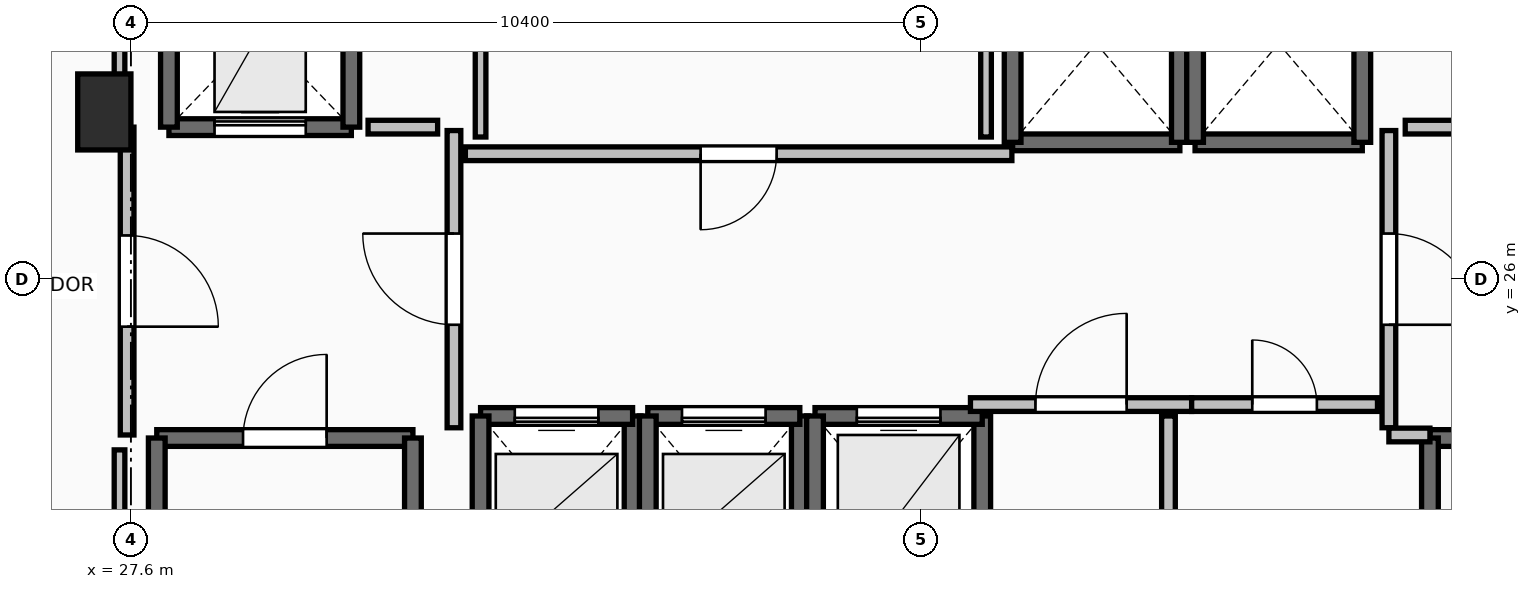
"""IFC4 building model, lengths in metres.
Left out: names, types, materials, properties, quantities, classifications, styles, units other than length and angle.
Written with IfcOpenShell. Run it as: python <this file> out.ifc"""

import sys

from ifc_helpers import new_model, si_unit, direction, frame, frame_2d, origin, origin_2d, place, context, subcontext, project, spatial, rectangle, extrude, element, fill, save


model = new_model("IFC4")
c1 = context("Model", 3, precision=1e-05, world=origin(), true_north=direction((0.0, 1.0)))
c2 = subcontext(c1, "Body", "Model", "MODEL_VIEW")
j1 = project(units=[si_unit("LENGTHUNIT", "METRE"), si_unit("PLANEANGLEUNIT", "RADIAN")], contexts=[c1])
p1 = place(None, origin())
s1 = spatial("IfcSite", under=j1, at=p1, CompositionType="ELEMENT")
p2 = place(p1, origin())
s2 = spatial("IfcBuilding", under=s1, at=p2, CompositionType="ELEMENT")
p3 = place(p2, frame((0.0, 0.0, 221.4)))
s3 = spatial("IfcBuildingStorey", under=s2, at=p3, CompositionType="ELEMENT", Elevation=221.4)
p4 = place(p3, frame((27.25, 28.2, 0.0), z_axis=(0.0, 0.0, 1.0), x_axis=(1.0, 0.0, 0.0)))
e1 = element("IfcColumn", 1, at=p4, inside=s3, PredefinedType="PILASTER", context=c2, shape_type="SweptSolid", body=[
    extrude(rectangle(XDim=0.7, YDim=1.0, at=origin_2d()), origin(), (0.0, 0.0, 1.0), 3.55),
])
p5 = place(p3, frame((27.94, 23.91, 0.0), z_axis=(0.0, 0.0, 1.0), x_axis=(1.0, 0.0, 0.0)))
e2 = element("IfcWall", 2, at=p5, inside=s3, PredefinedType="SOLIDWALL", context=c2, shape_type="SweptSolid", body=[
    extrude(rectangle(XDim=3.37, YDim=0.22, at=frame_2d((1.685, 0.0))), origin(), (0.0, 0.0, 1.0), 3.2),
])
p6 = place(p5, frame((1.135, 0.0, 0.0)))
e3 = element("IfcOpeningElement", 3, at=p6, cuts=e2, PredefinedType="OPENING", context=c2, shape_type="SweptSolid", body=[
    extrude(rectangle(XDim=1.1, YDim=2.15, at=frame_2d((0.55, 1.075))), frame((0.0, 0.125, 0.0), z_axis=(0.0, -1.0, 0.0), x_axis=(1.0, 0.0, 0.0)), (0.0, 0.0, 1.0), 0.25),
])
for number, where, z_axis, x_axis in (
    (4, (31.31, 23.91, 0.0), (0.0, 0.0, 1.0), (0.0, -1.0, 0.0)),
    (5, (27.94, 16.49, 0.0), (0.0, 0.0, 1.0), (0.0, 1.0, 0.0)),
):
    element("IfcWall", number, at=place(p3, frame(where, z_axis=z_axis, x_axis=x_axis)), inside=s3, PredefinedType="SOLIDWALL", context=c2, shape_type="SweptSolid", body=[
        extrude(rectangle(XDim=7.42, YDim=0.22, at=frame_2d((3.71, 0.0))), origin(), (0.0, 0.0, 1.0), 3.2),
    ])
p7 = place(p3, frame((44.69, 23.91, 0.0), z_axis=(0.0, 0.0, 1.0), x_axis=(1.0, 0.0, 0.0)))
e6 = element("IfcWall", 6, at=p7, inside=s3, PredefinedType="SOLIDWALL", context=c2, shape_type="SweptSolid", body=[
    extrude(rectangle(XDim=3.37, YDim=0.22, at=frame_2d((1.685, 0.0))), origin(), (0.0, 0.0, 1.0), 3.2),
])
p8 = place(p7, frame((1.135, 0.0, 0.0)))
e7 = element("IfcOpeningElement", 7, at=p8, cuts=e6, PredefinedType="OPENING", context=c2, shape_type="SweptSolid", body=[
    extrude(rectangle(XDim=1.1, YDim=2.15, at=frame_2d((0.55, 1.075))), frame((0.0, 0.125, 0.0), z_axis=(0.0, -1.0, 0.0), x_axis=(1.0, 0.0, 0.0)), (0.0, 0.0, 1.0), 0.25),
])
p9 = place(p3, frame((44.69, 16.49, 0.0), z_axis=(0.0, 0.0, 1.0), x_axis=(0.0, 1.0, 0.0)))
e8 = element("IfcWall", 8, at=p9, inside=s3, PredefinedType="SOLIDWALL", context=c2, shape_type="SweptSolid", body=[
    extrude(rectangle(XDim=7.42, YDim=0.22, at=frame_2d((3.71, 0.0))), origin(), (0.0, 0.0, 1.0), 3.2),
])
p10 = place(p3, frame((34.2, 21.8, 0.0), z_axis=(0.0, 0.0, 1.0), x_axis=(0.0, 1.0, 0.0)))
e9 = element("IfcWall", 9, at=p10, inside=s3, PredefinedType="SOLIDWALL", context=c2, shape_type="SweptSolid", body=[
    extrude(rectangle(XDim=2.4, YDim=0.22, at=frame_2d((1.2, 0.0))), origin(), (0.0, 0.0, 1.0), 3.2),
])
p11 = place(p3, frame((34.2, 24.2, 0.0), z_axis=(0.0, 0.0, 1.0), x_axis=(-1.0, 0.0, 0.0)))
e10 = element("IfcWall", 10, at=p11, inside=s3, PredefinedType="SOLIDWALL", context=c2, shape_type="SweptSolid", body=[
    extrude(rectangle(XDim=2.0, YDim=0.22, at=frame_2d((1.0, 0.0))), origin(), (0.0, 0.0, 1.0), 3.2),
])
p12 = place(p11, frame((0.45, 0.0, 0.0)))
e11 = element("IfcOpeningElement", 11, at=p12, cuts=e10, PredefinedType="OPENING", context=c2, shape_type="SweptSolid", body=[
    extrude(rectangle(XDim=1.1, YDim=2.2, at=frame_2d((0.55, 1.1))), frame((0.0, 0.125, 0.0), z_axis=(0.0, -1.0, 0.0), x_axis=(1.0, 0.0, 0.0)), (0.0, 0.0, 1.0), 0.25),
])
for number, where, z_axis, x_axis in (
    (12, (32.2, 24.2, 0.0), (0.0, 0.0, 1.0), (0.0, -1.0, 0.0)),
    (13, (36.4, 21.8, 0.0), (0.0, 0.0, 1.0), (0.0, 1.0, 0.0)),
):
    element("IfcWall", number, at=place(p3, frame(where, z_axis=z_axis, x_axis=x_axis)), inside=s3, PredefinedType="SOLIDWALL", context=c2, shape_type="SweptSolid", body=[
        extrude(rectangle(XDim=2.4, YDim=0.22, at=frame_2d((1.2, 0.0))), origin(), (0.0, 0.0, 1.0), 3.2),
    ])
p13 = place(p3, frame((36.4, 24.2, 0.0), z_axis=(0.0, 0.0, 1.0), x_axis=(-1.0, 0.0, 0.0)))
e14 = element("IfcWall", 14, at=p13, inside=s3, PredefinedType="SOLIDWALL", context=c2, shape_type="SweptSolid", body=[
    extrude(rectangle(XDim=2.0, YDim=0.22, at=frame_2d((1.0, 0.0))), origin(), (0.0, 0.0, 1.0), 3.2),
])
p14 = place(p13, frame((0.45, 0.0, 0.0)))
e15 = element("IfcOpeningElement", 15, at=p14, cuts=e14, PredefinedType="OPENING", context=c2, shape_type="SweptSolid", body=[
    extrude(rectangle(XDim=1.1, YDim=2.2, at=frame_2d((0.55, 1.1))), frame((0.0, 0.125, 0.0), z_axis=(0.0, -1.0, 0.0), x_axis=(1.0, 0.0, 0.0)), (0.0, 0.0, 1.0), 0.25),
])
p15 = place(p3, frame((34.4, 24.2, 0.0), z_axis=(0.0, 0.0, 1.0), x_axis=(0.0, -1.0, 0.0)))
e16 = element("IfcWall", 16, at=p15, inside=s3, PredefinedType="SOLIDWALL", context=c2, shape_type="SweptSolid", body=[
    extrude(rectangle(XDim=2.4, YDim=0.22, at=frame_2d((1.2, 0.0))), origin(), (0.0, 0.0, 1.0), 3.2),
])
p16 = place(p3, frame((38.8, 21.6, 0.0), z_axis=(0.0, 0.0, 1.0), x_axis=(0.0, 1.0, 0.0)))
e17 = element("IfcWall", 17, at=p16, inside=s3, PredefinedType="SOLIDWALL", context=c2, shape_type="SweptSolid", body=[
    extrude(rectangle(XDim=2.6, YDim=0.22, at=frame_2d((1.3, 0.0))), origin(), (0.0, 0.0, 1.0), 3.2),
])
p17 = place(p3, frame((38.8, 24.2, 0.0), z_axis=(0.0, 0.0, 1.0), x_axis=(-1.0, 0.0, 0.0)))
e18 = element("IfcWall", 18, at=p17, inside=s3, PredefinedType="SOLIDWALL", context=c2, shape_type="SweptSolid", body=[
    extrude(rectangle(XDim=2.2, YDim=0.22, at=frame_2d((1.1, 0.0))), origin(), (0.0, 0.0, 1.0), 3.2),
])
p18 = place(p17, frame((0.55, 0.0, 0.0)))
e19 = element("IfcOpeningElement", 19, at=p18, cuts=e18, PredefinedType="OPENING", context=c2, shape_type="SweptSolid", body=[
    extrude(rectangle(XDim=1.1, YDim=2.2, at=frame_2d((0.55, 1.1))), frame((0.0, 0.125, 0.0), z_axis=(0.0, -1.0, 0.0), x_axis=(1.0, 0.0, 0.0)), (0.0, 0.0, 1.0), 0.25),
])
p19 = place(p3, frame((36.6, 24.2, 0.0), z_axis=(0.0, 0.0, 1.0), x_axis=(0.0, -1.0, 0.0)))
e20 = element("IfcWall", 20, at=p19, inside=s3, PredefinedType="SOLIDWALL", context=c2, shape_type="SweptSolid", body=[
    extrude(rectangle(XDim=2.6, YDim=0.22, at=frame_2d((1.3, 0.0))), origin(), (0.0, 0.0, 1.0), 3.2),
])
p20 = place(p3, frame((39.2, 27.8, 0.0), z_axis=(0.0, 0.0, 1.0), x_axis=(1.0, 0.0, 0.0)))
e21 = element("IfcWall", 21, at=p20, inside=s3, PredefinedType="SOLIDWALL", context=c2, shape_type="SweptSolid", body=[
    extrude(rectangle(XDim=2.2, YDim=0.22, at=frame_2d((1.1, 0.0))), origin(), (0.0, 0.0, 1.0), 3.2),
])
for number, where, z_axis, x_axis in (
    (22, (41.4, 27.8, 0.0), (0.0, 0.0, 1.0), (0.0, 1.0, 0.0)),
    (23, (39.2, 30.4, 0.0), (0.0, 0.0, 1.0), (0.0, -1.0, 0.0)),
):
    element("IfcWall", number, at=place(p3, frame(where, z_axis=z_axis, x_axis=x_axis)), inside=s3, PredefinedType="SOLIDWALL", context=c2, shape_type="SweptSolid", body=[
        extrude(rectangle(XDim=2.6, YDim=0.22, at=frame_2d((1.3, 0.0))), origin(), (0.0, 0.0, 1.0), 3.2),
    ])
p21 = place(p3, frame((41.6, 27.8, 0.0), z_axis=(0.0, 0.0, 1.0), x_axis=(1.0, 0.0, 0.0)))
e24 = element("IfcWall", 24, at=p21, inside=s3, PredefinedType="SOLIDWALL", context=c2, shape_type="SweptSolid", body=[
    extrude(rectangle(XDim=2.2, YDim=0.22, at=frame_2d((1.1, 0.0))), origin(), (0.0, 0.0, 1.0), 3.2),
])
for number, where, z_axis, x_axis in (
    (25, (43.8, 27.8, 0.0), (0.0, 0.0, 1.0), (0.0, 1.0, 0.0)),
    (26, (41.6, 30.4, 0.0), (0.0, 0.0, 1.0), (0.0, -1.0, 0.0)),
):
    element("IfcWall", number, at=place(p3, frame(where, z_axis=z_axis, x_axis=x_axis)), inside=s3, PredefinedType="SOLIDWALL", context=c2, shape_type="SweptSolid", body=[
        extrude(rectangle(XDim=2.6, YDim=0.22, at=frame_2d((1.3, 0.0))), origin(), (0.0, 0.0, 1.0), 3.2),
    ])
p22 = place(p3, frame((28.1, 28.0, 0.0), z_axis=(0.0, 0.0, 1.0), x_axis=(1.0, 0.0, 0.0)))
e27 = element("IfcWall", 27, at=p22, inside=s3, PredefinedType="SHEAR", context=c2, shape_type="SweptSolid", body=[
    extrude(rectangle(XDim=2.4, YDim=0.22, at=frame_2d((1.2, 0.0))), origin(), (0.0, 0.0, 1.0), 3.2),
])
p23 = place(p22, frame((0.6, 0.0, 0.0)))
e28 = element("IfcOpeningElement", 28, at=p23, cuts=e27, PredefinedType="OPENING", context=c2, shape_type="SweptSolid", body=[
    extrude(rectangle(XDim=1.2, YDim=2.2, at=frame_2d((0.6, 1.1))), frame((0.0, 0.125, 0.0), z_axis=(0.0, -1.0, 0.0), x_axis=(1.0, 0.0, 0.0)), (0.0, 0.0, 1.0), 0.25),
])
for number, where, z_axis, x_axis in (
    (29, (30.5, 28.0, 0.0), (0.0, 0.0, 1.0), (0.0, 1.0, 0.0)),
    (30, (28.1, 30.5, 0.0), (0.0, 0.0, 1.0), (0.0, -1.0, 0.0)),
):
    element("IfcWall", number, at=place(p3, frame(where, z_axis=z_axis, x_axis=x_axis)), inside=s3, PredefinedType="SHEAR", context=c2, shape_type="SweptSolid", body=[
        extrude(rectangle(XDim=2.5, YDim=0.22, at=frame_2d((1.25, 0.0))), origin(), (0.0, 0.0, 1.0), 3.2),
    ])
p24 = place(p3, frame((31.85, 24.045, 0.0), z_axis=(0.0, 0.0, 1.0), x_axis=(0.0, 1.0, 0.0)))
e31 = element("IfcWall", 31, at=p24, inside=s3, PredefinedType="PARTITIONING", context=c2, shape_type="SweptSolid", body=[
    extrude(rectangle(XDim=3.91, YDim=0.18, at=frame_2d((1.955, 0.0))), origin(), (0.0, 0.0, 1.0), 3.2),
])
p25 = place(p24, frame((1.355, 0.0, 0.0)))
e32 = element("IfcOpeningElement", 32, at=p25, cuts=e31, PredefinedType="OPENING", context=c2, shape_type="SweptSolid", body=[
    extrude(rectangle(XDim=1.2, YDim=2.15, at=frame_2d((0.6, 1.075))), frame((0.0, 0.105, 0.0), z_axis=(0.0, -1.0, 0.0), x_axis=(1.0, 0.0, 0.0)), (0.0, 0.0, 1.0), 0.21),
])
p26 = place(p3, frame((27.55, 28.0, 0.0), z_axis=(0.0, 0.0, 1.0), x_axis=(0.0, -1.0, 0.0)))
e33 = element("IfcWall", 33, at=p26, inside=s3, PredefinedType="PARTITIONING", context=c2, shape_type="SweptSolid", body=[
    extrude(rectangle(XDim=4.05, YDim=0.18, at=frame_2d((2.025, 0.0))), origin(), (0.0, 0.0, 1.0), 3.2),
])
p27 = place(p26, frame((1.425, 0.0, 0.0)))
e34 = element("IfcOpeningElement", 34, at=p27, cuts=e33, PredefinedType="OPENING", context=c2, shape_type="SweptSolid", body=[
    extrude(rectangle(XDim=1.2, YDim=2.15, at=frame_2d((0.6, 1.075))), frame((0.0, 0.105, 0.0), z_axis=(0.0, -1.0, 0.0), x_axis=(1.0, 0.0, 0.0)), (0.0, 0.0, 1.0), 0.21),
])
p28 = place(p3, frame((44.15, 27.955, 0.0), z_axis=(0.0, 0.0, 1.0), x_axis=(0.0, -1.0, 0.0)))
e35 = element("IfcWall", 35, at=p28, inside=s3, PredefinedType="PARTITIONING", context=c2, shape_type="SweptSolid", body=[
    extrude(rectangle(XDim=3.91, YDim=0.18, at=frame_2d((1.955, 0.0))), origin(), (0.0, 0.0, 1.0), 3.2),
])
p29 = place(p28, frame((1.355, 0.0, 0.0)))
e36 = element("IfcOpeningElement", 36, at=p29, cuts=e35, PredefinedType="OPENING", context=c2, shape_type="SweptSolid", body=[
    extrude(rectangle(XDim=1.2, YDim=2.15, at=frame_2d((0.6, 1.075))), frame((0.0, 0.105, 0.0), z_axis=(0.0, -1.0, 0.0), x_axis=(1.0, 0.0, 0.0)), (0.0, 0.0, 1.0), 0.21),
])
p30 = place(p3, frame((44.15, 23.95, 0.0), z_axis=(0.0, 0.0, 1.0), x_axis=(1.0, 0.0, 0.0)))
e37 = element("IfcWall", 37, at=p30, inside=s3, PredefinedType="PARTITIONING", context=c2, shape_type="SweptSolid", body=[
    extrude(rectangle(XDim=0.54, YDim=0.18, at=frame_2d((0.27, 0.0))), origin(), (0.0, 0.0, 1.0), 3.2),
])
p31 = place(p3, frame((38.645, 24.35, 0.0), z_axis=(0.0, 0.0, 1.0), x_axis=(1.0, 0.0, 0.0)))
e38 = element("IfcWall", 38, at=p31, inside=s3, PredefinedType="PARTITIONING", context=c2, shape_type="SweptSolid", body=[
    extrude(rectangle(XDim=2.91, YDim=0.18, at=frame_2d((1.455, 0.0))), origin(), (0.0, 0.0, 1.0), 3.2),
])
p32 = place(p31, frame((0.855, 0.0, 0.0)))
e39 = element("IfcOpeningElement", 39, at=p32, cuts=e38, PredefinedType="OPENING", context=c2, shape_type="SweptSolid", body=[
    extrude(rectangle(XDim=1.2, YDim=2.15, at=frame_2d((0.6, 1.075))), frame((0.0, 0.105, 0.0), z_axis=(0.0, -1.0, 0.0), x_axis=(1.0, 0.0, 0.0)), (0.0, 0.0, 1.0), 0.21),
])
p33 = place(p3, frame((41.555, 24.35, 0.0), z_axis=(0.0, 0.0, 1.0), x_axis=(1.0, 0.0, 0.0)))
e40 = element("IfcWall", 40, at=p33, inside=s3, PredefinedType="PARTITIONING", context=c2, shape_type="SweptSolid", body=[
    extrude(rectangle(XDim=2.445, YDim=0.18, at=frame_2d((1.223, 0.0))), origin(), (0.0, 0.0, 1.0), 3.2),
])
p34 = place(p33, frame((0.798, 0.0, 0.0)))
e41 = element("IfcOpeningElement", 41, at=p34, cuts=e40, PredefinedType="OPENING", context=c2, shape_type="SweptSolid", body=[
    extrude(rectangle(XDim=0.85, YDim=2.1, at=frame_2d((0.425, 1.05))), frame((0.0, 0.105, 0.0), z_axis=(0.0, -1.0, 0.0), x_axis=(1.0, 0.0, 0.0)), (0.0, 0.0, 1.0), 0.21),
])
p35 = place(p3, frame((39.19, 27.65, 0.0), z_axis=(0.0, 0.0, 1.0), x_axis=(-1.0, 0.0, 0.0)))
e42 = element("IfcWall", 42, at=p35, inside=s3, PredefinedType="PARTITIONING", context=c2, shape_type="SweptSolid", body=[
    extrude(rectangle(XDim=7.19, YDim=0.18, at=frame_2d((3.595, 0.0))), origin(), (0.0, 0.0, 1.0), 3.2),
])
p36 = place(p35, frame((3.095, 0.0, 0.0)))
e43 = element("IfcOpeningElement", 43, at=p36, cuts=e42, PredefinedType="OPENING", context=c2, shape_type="SweptSolid", body=[
    extrude(rectangle(XDim=1.0, YDim=2.15, at=frame_2d((0.5, 1.075))), frame((0.0, 0.105, 0.0), z_axis=(0.0, -1.0, 0.0), x_axis=(1.0, 0.0, 0.0)), (0.0, 0.0, 1.0), 0.21),
])
p37 = place(p3, frame((41.25, 20.305, 0.0), z_axis=(0.0, 0.0, 1.0), x_axis=(0.0, 1.0, 0.0)))
e44 = element("IfcWall", 44, at=p37, inside=s3, PredefinedType="PARTITIONING", context=c2, shape_type="SweptSolid", body=[
    extrude(rectangle(XDim=3.895, YDim=0.18, at=frame_2d((1.948, 0.0))), origin(), (0.0, 0.0, 1.0), 3.2),
])
p38 = place(p37, frame((1.522, 0.0, 0.0)))
e45 = element("IfcOpeningElement", 45, at=p38, cuts=e44, PredefinedType="OPENING", context=c2, shape_type="SweptSolid", body=[
    extrude(rectangle(XDim=0.85, YDim=2.1, at=frame_2d((0.425, 1.05))), frame((0.0, 0.105, 0.0), z_axis=(0.0, -1.0, 0.0), x_axis=(1.0, 0.0, 0.0)), (0.0, 0.0, 1.0), 0.21),
])
for number, where, z_axis, x_axis in (
    (46, (31.635, 28.0, 0.0), (0.0, 0.0, 1.0), (-1.0, 0.0, 0.0)),
    (47, (45.28, 28.0, 0.0), (0.0, 0.0, 1.0), (-1.0, 0.0, 0.0)),
):
    element("IfcWall", number, at=place(p3, frame(where, z_axis=z_axis, x_axis=x_axis)), inside=s3, PredefinedType="PARTITIONING", context=c2, shape_type="SweptSolid", body=[
        extrude(rectangle(XDim=0.915, YDim=0.18, at=frame_2d((0.458, 0.0))), origin(), (0.0, 0.0, 1.0), 3.2),
    ])
for number, where, z_axis, x_axis in (
    (48, (32.2, 30.26, 0.0), (0.0, 0.0, 1.0), (0.0, -1.0, 0.0)),
    (49, (38.85, 27.87, 0.0), (0.0, 0.0, 1.0), (0.0, 1.0, 0.0)),
):
    element("IfcWall", number, at=place(p3, frame(where, z_axis=z_axis, x_axis=x_axis)), inside=s3, PredefinedType="PARTITIONING", context=c2, shape_type="SweptSolid", body=[
        extrude(rectangle(XDim=2.39, YDim=0.14, at=frame_2d((1.195, 0.0))), origin(), (0.0, 0.0, 1.0), 3.2),
    ])
p39 = place(p3, frame((27.45, 33.45, 0.0), z_axis=(0.0, 0.0, 1.0), x_axis=(0.0, -1.0, 0.0)))
e50 = element("IfcWall", 50, at=p39, inside=s3, PredefinedType="PARTITIONING", context=c2, shape_type="SweptSolid", body=[
    extrude(rectangle(XDim=5.254, YDim=0.14, at=frame_2d((2.627, 0.0))), origin(), (0.0, 0.0, 1.0), 2.392),
])
p40 = place(p3, frame((27.45, 23.754, 0.0), z_axis=(0.0, 0.0, 1.0), x_axis=(0.0, -1.0, 0.0)))
e51 = element("IfcWall", 51, at=p40, inside=s3, PredefinedType="PARTITIONING", context=c2, shape_type="SweptSolid", body=[
    extrude(rectangle(XDim=7.514, YDim=0.14, at=frame_2d((3.757, 0.0))), origin(), (0.0, 0.0, 1.0), 2.392),
])
p41 = place(p6, origin())
e52 = element("IfcDoor", 52, at=p41, inside=s3, OperationType="SINGLE_SWING_RIGHT", PredefinedType="DOOR", context=c2, shape_type="SweptSolid", body=[
    extrude(rectangle(XDim=1.1, YDim=2.15, at=frame_2d((0.55, 1.075))), frame((0.0, 0.025, 0.0), z_axis=(0.0, -1.0, 0.0), x_axis=(1.0, 0.0, 0.0)), (0.0, 0.0, 1.0), 0.05),
])
fill(e3, e52)
p42 = place(p12, origin())
e53 = element("IfcDoor", 53, at=p42, inside=s3, OperationType="SLIDING_TO_LEFT", PredefinedType="DOOR", context=c2, shape_type="SweptSolid", body=[
    extrude(rectangle(XDim=1.1, YDim=2.2, at=frame_2d((0.55, 1.1))), frame((0.0, 0.025, 0.0), z_axis=(0.0, -1.0, 0.0), x_axis=(1.0, 0.0, 0.0)), (0.0, 0.0, 1.0), 0.05),
])
fill(e11, e53)
p43 = place(p14, origin())
e54 = element("IfcDoor", 54, at=p43, inside=s3, OperationType="SLIDING_TO_LEFT", PredefinedType="DOOR", context=c2, shape_type="SweptSolid", body=[
    extrude(rectangle(XDim=1.1, YDim=2.2, at=frame_2d((0.55, 1.1))), frame((0.0, 0.025, 0.0), z_axis=(0.0, -1.0, 0.0), x_axis=(1.0, 0.0, 0.0)), (0.0, 0.0, 1.0), 0.05),
])
fill(e15, e54)
p44 = place(p18, origin())
e55 = element("IfcDoor", 55, at=p44, inside=s3, OperationType="SLIDING_TO_LEFT", PredefinedType="DOOR", context=c2, shape_type="SweptSolid", body=[
    extrude(rectangle(XDim=1.1, YDim=2.2, at=frame_2d((0.55, 1.1))), frame((0.0, 0.025, 0.0), z_axis=(0.0, -1.0, 0.0), x_axis=(1.0, 0.0, 0.0)), (0.0, 0.0, 1.0), 0.05),
])
fill(e19, e55)
p45 = place(p23, origin())
e56 = element("IfcDoor", 56, at=p45, inside=s3, OperationType="SLIDING_TO_LEFT", PredefinedType="DOOR", context=c2, shape_type="SweptSolid", body=[
    extrude(rectangle(XDim=1.2, YDim=2.2, at=frame_2d((0.6, 1.1))), frame((0.0, 0.025, 0.0), z_axis=(0.0, -1.0, 0.0), x_axis=(1.0, 0.0, 0.0)), (0.0, 0.0, 1.0), 0.05),
])
fill(e28, e56)
p46 = place(p25, origin())
e57 = element("IfcDoor", 57, at=p46, inside=s3, OperationType="SINGLE_SWING_RIGHT", PredefinedType="DOOR", context=c2, shape_type="SweptSolid", body=[
    extrude(rectangle(XDim=1.2, YDim=2.15, at=frame_2d((0.6, 1.075))), frame((0.0, 0.025, 0.0), z_axis=(0.0, -1.0, 0.0), x_axis=(1.0, 0.0, 0.0)), (0.0, 0.0, 1.0), 0.05),
])
fill(e32, e57)
p47 = place(p27, origin())
e58 = element("IfcDoor", 58, at=p47, inside=s3, OperationType="SINGLE_SWING_RIGHT", PredefinedType="DOOR", context=c2, shape_type="SweptSolid", body=[
    extrude(rectangle(XDim=1.2, YDim=2.15, at=frame_2d((0.6, 1.075))), frame((0.0, 0.025, 0.0), z_axis=(0.0, -1.0, 0.0), x_axis=(1.0, 0.0, 0.0)), (0.0, 0.0, 1.0), 0.05),
])
fill(e34, e58)
p48 = place(p29, origin())
e59 = element("IfcDoor", 59, at=p48, inside=s3, OperationType="SINGLE_SWING_RIGHT", PredefinedType="DOOR", context=c2, shape_type="SweptSolid", body=[
    extrude(rectangle(XDim=1.2, YDim=2.15, at=frame_2d((0.6, 1.075))), frame((0.0, 0.025, 0.0), z_axis=(0.0, -1.0, 0.0), x_axis=(1.0, 0.0, 0.0)), (0.0, 0.0, 1.0), 0.05),
])
fill(e36, e59)
p49 = place(p32, origin())
e60 = element("IfcDoor", 60, at=p49, inside=s3, OperationType="SINGLE_SWING_RIGHT", PredefinedType="DOOR", context=c2, shape_type="SweptSolid", body=[
    extrude(rectangle(XDim=1.2, YDim=2.15, at=frame_2d((0.6, 1.075))), frame((0.0, 0.025, 0.0), z_axis=(0.0, -1.0, 0.0), x_axis=(1.0, 0.0, 0.0)), (0.0, 0.0, 1.0), 0.05),
])
fill(e39, e60)
p50 = place(p34, origin())
e61 = element("IfcDoor", 61, at=p50, inside=s3, OperationType="SINGLE_SWING_LEFT", PredefinedType="DOOR", context=c2, shape_type="SweptSolid", body=[
    extrude(rectangle(XDim=0.85, YDim=2.1, at=frame_2d((0.425, 1.05))), frame((0.0, 0.025, 0.0), z_axis=(0.0, -1.0, 0.0), x_axis=(1.0, 0.0, 0.0)), (0.0, 0.0, 1.0), 0.05),
])
fill(e41, e61)
p51 = place(p36, origin())
e62 = element("IfcDoor", 62, at=p51, inside=s3, OperationType="SINGLE_SWING_RIGHT", PredefinedType="DOOR", context=c2, shape_type="SweptSolid", body=[
    extrude(rectangle(XDim=1.0, YDim=2.15, at=frame_2d((0.5, 1.075))), frame((0.0, 0.025, 0.0), z_axis=(0.0, -1.0, 0.0), x_axis=(1.0, 0.0, 0.0)), (0.0, 0.0, 1.0), 0.05),
])
fill(e43, e62)
save(model, sys.argv[1])
